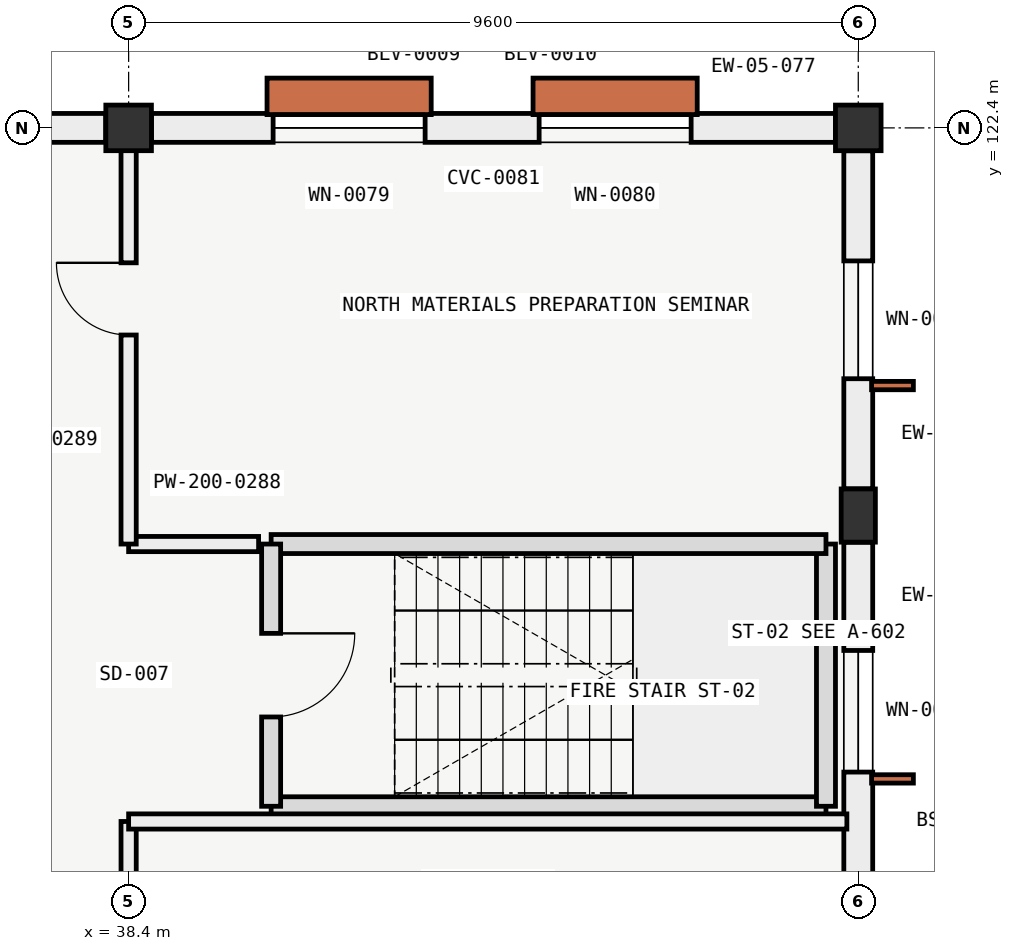
"""IFC4 building model, lengths in metres.
Left out: names, types, materials, properties, quantities, classifications, styles, units other than length and angle.
Written with IfcOpenShell. Run it as: python <this file> out.ifc"""

import sys

from ifc_helpers import new_model, si_unit, direction, frame, frame_2d, origin, origin_2d, place, context, subcontext, project, spatial, rectangle, extrude, element, fill, save


model = new_model("IFC4")
c1 = context("Model", 3, precision=1e-05, world=origin(), true_north=direction((0.0, 1.0)))
c2 = subcontext(c1, "Body", "Model", "MODEL_VIEW")
j1 = project(units=[si_unit("LENGTHUNIT", "METRE"), si_unit("PLANEANGLEUNIT", "RADIAN")], contexts=[c1])
p1 = place(None, origin())
s1 = spatial("IfcSite", under=j1, at=p1, CompositionType="ELEMENT")
p2 = place(p1, origin())
s2 = spatial("IfcBuilding", under=s1, at=p2, CompositionType="ELEMENT")
p3 = place(p2, frame((0.0, 0.0, 5.4)))
s3 = spatial("IfcBuildingStorey", under=s2, at=p3, CompositionType="ELEMENT", Elevation=5.4)
for number, where, z_axis, x_axis in (
    (1, (38.4, 122.4, 0.0), (0.0, 0.0, 1.0), (1.0, 0.0, 0.0)),
    (2, (48.0, 122.4, 0.0), (0.0, 0.0, 1.0), (1.0, 0.0, 0.0)),
):
    element("IfcColumn", number, at=place(p3, frame(where, z_axis=z_axis, x_axis=x_axis)), inside=s3, PredefinedType="COLUMN", context=c2, shape_type="SweptSolid", body=[
        extrude(rectangle(XDim=0.6, YDim=0.6, at=origin_2d()), origin(), (0.0, 0.0, 1.0), 4.2),
    ])
p4 = place(p3, frame((48.0, 117.3, 0.0), z_axis=(0.0, 0.0, 1.0), x_axis=(1.0, 0.0, 0.0)))
e3 = element("IfcColumn", 3, at=p4, inside=s3, PredefinedType="PILASTER", context=c2, shape_type="SweptSolid", body=[
    extrude(rectangle(XDim=0.45, YDim=0.7, at=origin_2d()), origin(), (0.0, 0.0, 1.0), 4.2),
])
p5 = place(p3, frame((48.0, 116.949, 0.0), z_axis=(0.0, 0.0, 1.0), x_axis=(0.0, -1.0, 0.0)))
e4 = element("IfcWall", 4, at=p5, inside=s3, PredefinedType="SOLIDWALL", context=c2, shape_type="SweptSolid", body=[
    extrude(rectangle(XDim=4.448, YDim=0.38, at=frame_2d((2.224, 0.0))), origin(), (0.0, 0.0, 1.0), 3.25),
])
p6 = place(p5, frame((1.424, 0.0, 0.95)))
e5 = element("IfcOpeningElement", 5, at=p6, cuts=e4, PredefinedType="OPENING", context=c2, shape_type="SweptSolid", body=[
    extrude(rectangle(XDim=1.6, YDim=1.9, at=frame_2d((0.8, 0.95))), frame((0.0, 0.2, 0.0), z_axis=(0.0, -1.0, 0.0), x_axis=(1.0, 0.0, 0.0)), (0.0, 0.0, 1.0), 0.4),
])
p7 = place(p3, frame((48.0, 122.099, 0.0), z_axis=(0.0, 0.0, 1.0), x_axis=(0.0, -1.0, 0.0)))
e6 = element("IfcWall", 6, at=p7, inside=s3, PredefinedType="SOLIDWALL", context=c2, shape_type="SweptSolid", body=[
    extrude(rectangle(XDim=4.448, YDim=0.38, at=frame_2d((2.224, 0.0))), origin(), (0.0, 0.0, 1.0), 3.25),
])
p8 = place(p7, frame((1.449, 0.0, 0.95)))
e7 = element("IfcOpeningElement", 7, at=p8, cuts=e6, PredefinedType="OPENING", context=c2, shape_type="SweptSolid", body=[
    extrude(rectangle(XDim=1.55, YDim=1.85, at=frame_2d((0.775, 0.925))), frame((0.0, 0.2, 0.0), z_axis=(0.0, -1.0, 0.0), x_axis=(1.0, 0.0, 0.0)), (0.0, 0.0, 1.0), 0.4),
])
p9 = place(p3, frame((35.4, 122.4, 0.0), z_axis=(0.0, 0.0, 1.0), x_axis=(1.0, 0.0, 0.0)))
e8 = element("IfcWall", 8, at=p9, inside=s3, PredefinedType="SOLIDWALL", context=c2, shape_type="SweptSolid", body=[
    extrude(rectangle(XDim=2.699, YDim=0.38, at=frame_2d((1.35, 0.0))), origin(), (0.0, 0.0, 1.0), 3.298),
])
p10 = place(p9, frame((0.899, 0.0, 0.85)))
e9 = element("IfcOpeningElement", 9, at=p10, cuts=e8, PredefinedType="OPENING", context=c2, shape_type="SweptSolid", body=[
    extrude(rectangle(XDim=0.9, YDim=2.2, at=frame_2d((0.45, 1.1))), frame((0.0, 0.2, 0.0), z_axis=(0.0, -1.0, 0.0), x_axis=(1.0, 0.0, 0.0)), (0.0, 0.0, 1.0), 0.4),
])
p11 = place(p3, frame((38.701, 122.4, 0.0), z_axis=(0.0, 0.0, 1.0), x_axis=(1.0, 0.0, 0.0)))
e10 = element("IfcWall", 10, at=p11, inside=s3, PredefinedType="SOLIDWALL", context=c2, shape_type="SweptSolid", body=[
    extrude(rectangle(XDim=8.998, YDim=0.38, at=frame_2d((4.499, 0.0))), origin(), (0.0, 0.0, 1.0), 3.32),
])
p12 = place(p11, frame((1.6, 0.0, 0.85)))
e11 = element("IfcOpeningElement", 11, at=p12, cuts=e10, PredefinedType="OPENING", context=c2, shape_type="SweptSolid", body=[
    extrude(rectangle(XDim=2.0, YDim=1.35, at=frame_2d((1.0, 0.675))), frame((0.0, 0.2, 0.0), z_axis=(0.0, -1.0, 0.0), x_axis=(1.0, 0.0, 0.0)), (0.0, 0.0, 1.0), 0.4),
])
p13 = place(p11, frame((5.1, 0.0, 0.85)))
e12 = element("IfcOpeningElement", 12, at=p13, cuts=e10, PredefinedType="OPENING", context=c2, shape_type="SweptSolid", body=[
    extrude(rectangle(XDim=2.0, YDim=1.35, at=frame_2d((1.0, 0.675))), frame((0.0, 0.2, 0.0), z_axis=(0.0, -1.0, 0.0), x_axis=(1.0, 0.0, 0.0)), (0.0, 0.0, 1.0), 0.4),
])
p14 = place(p3, frame((40.275, 113.475, 0.0), z_axis=(0.0, 0.0, 1.0), x_axis=(1.0, 0.0, 0.0)))
e13 = element("IfcWall", 13, at=p14, inside=s3, PredefinedType="SOLIDWALL", context=c2, shape_type="SweptSolid", body=[
    extrude(rectangle(XDim=7.3, YDim=0.25, at=frame_2d((3.65, 0.0))), origin(), (0.0, 0.0, 1.0), 3.92),
])
p15 = place(p3, frame((47.575, 113.475, 0.0), z_axis=(0.0, 0.0, 1.0), x_axis=(0.0, 1.0, 0.0)))
e14 = element("IfcWall", 14, at=p15, inside=s3, PredefinedType="SOLIDWALL", context=c2, shape_type="SweptSolid", body=[
    extrude(rectangle(XDim=3.45, YDim=0.25, at=frame_2d((1.725, 0.0))), origin(), (0.0, 0.0, 1.0), 3.92),
])
p16 = place(p3, frame((47.575, 116.925, 0.0), z_axis=(0.0, 0.0, 1.0), x_axis=(-1.0, 0.0, 0.0)))
e15 = element("IfcWall", 15, at=p16, inside=s3, PredefinedType="SOLIDWALL", context=c2, shape_type="SweptSolid", body=[
    extrude(rectangle(XDim=7.3, YDim=0.25, at=frame_2d((3.65, 0.0))), origin(), (0.0, 0.0, 1.0), 3.92),
])
p17 = place(p3, frame((40.275, 116.925, 0.0), z_axis=(0.0, 0.0, 1.0), x_axis=(0.0, -1.0, 0.0)))
e16 = element("IfcWall", 16, at=p17, inside=s3, PredefinedType="SOLIDWALL", context=c2, shape_type="SweptSolid", body=[
    extrude(rectangle(XDim=3.45, YDim=0.25, at=frame_2d((1.725, 0.0))), origin(), (0.0, 0.0, 1.0), 3.92),
])
p18 = place(p17, frame((1.175, 0.0, 0.0)))
e17 = element("IfcOpeningElement", 17, at=p18, cuts=e16, PredefinedType="OPENING", context=c2, shape_type="SweptSolid", body=[
    extrude(rectangle(XDim=1.1, YDim=2.2, at=frame_2d((0.55, 1.1))), frame((0.0, 0.135, 0.0), z_axis=(0.0, -1.0, 0.0), x_axis=(1.0, 0.0, 0.0)), (0.0, 0.0, 1.0), 0.27),
])
p19 = place(p3, frame((38.4, 88.375, 0.0), z_axis=(0.0, 0.0, 1.0), x_axis=(0.0, 1.0, 0.0)))
e18 = element("IfcWall", 18, at=p19, inside=s3, PredefinedType="PARTITIONING", context=c2, shape_type="SweptSolid", body=[
    extrude(rectangle(XDim=24.9, YDim=0.2, at=frame_2d((12.45, 0.0))), origin(), (0.0, 0.0, 1.0), 3.298),
])
p20 = place(p19, frame((5.8, 0.0, 0.0)))
e19 = element("IfcOpeningElement", 19, at=p20, cuts=e18, PredefinedType="OPENING", context=c2, shape_type="SweptSolid", body=[
    extrude(rectangle(XDim=0.95, YDim=2.1, at=frame_2d((0.475, 1.05))), frame((0.0, 0.11, 0.0), z_axis=(0.0, -1.0, 0.0), x_axis=(1.0, 0.0, 0.0)), (0.0, 0.0, 1.0), 0.22),
])
p21 = place(p19, frame((11.2, 0.0, 0.0)))
e20 = element("IfcOpeningElement", 20, at=p21, cuts=e18, PredefinedType="OPENING", context=c2, shape_type="SweptSolid", body=[
    extrude(rectangle(XDim=0.95, YDim=2.1, at=frame_2d((0.475, 1.05))), frame((0.0, 0.11, 0.0), z_axis=(0.0, -1.0, 0.0), x_axis=(1.0, 0.0, 0.0)), (0.0, 0.0, 1.0), 0.22),
])
p22 = place(p19, frame((20.6, 0.0, 0.0)))
e21 = element("IfcOpeningElement", 21, at=p22, cuts=e18, PredefinedType="OPENING", context=c2, shape_type="SweptSolid", body=[
    extrude(rectangle(XDim=0.95, YDim=2.1, at=frame_2d((0.475, 1.05))), frame((0.0, 0.11, 0.0), z_axis=(0.0, -1.0, 0.0), x_axis=(1.0, 0.0, 0.0)), (0.0, 0.0, 1.0), 0.22),
])
p23 = place(p3, frame((38.4, 113.275, 0.0), z_axis=(0.0, 0.0, 1.0), x_axis=(1.0, 0.0, 0.0)))
e22 = element("IfcWall", 22, at=p23, inside=s3, PredefinedType="PARTITIONING", context=c2, shape_type="SweptSolid", body=[
    extrude(rectangle(XDim=9.45, YDim=0.2, at=frame_2d((4.725, 0.0))), origin(), (0.0, 0.0, 1.0), 3.443),
])
p24 = place(p3, frame((38.4, 116.925, 0.0), z_axis=(0.0, 0.0, 1.0), x_axis=(1.0, 0.0, 0.0)))
e23 = element("IfcWall", 23, at=p24, inside=s3, PredefinedType="PARTITIONING", context=c2, shape_type="SweptSolid", body=[
    extrude(rectangle(XDim=1.71, YDim=0.2, at=frame_2d((0.855, 0.0))), origin(), (0.0, 0.0, 1.0), 3.443),
])
p25 = place(p3, frame((38.4, 116.925, 0.0), z_axis=(0.0, 0.0, 1.0), x_axis=(0.0, 1.0, 0.0)))
e24 = element("IfcWall", 24, at=p25, inside=s3, PredefinedType="PARTITIONING", context=c2, shape_type="SweptSolid", body=[
    extrude(rectangle(XDim=5.325, YDim=0.2, at=frame_2d((2.663, 0.0))), origin(), (0.0, 0.0, 1.0), 3.443),
])
p26 = place(p25, frame((2.75, 0.0, 0.0)))
e25 = element("IfcOpeningElement", 25, at=p26, cuts=e24, PredefinedType="OPENING", context=c2, shape_type="SweptSolid", body=[
    extrude(rectangle(XDim=0.95, YDim=2.1, at=frame_2d((0.475, 1.05))), frame((0.0, 0.11, 0.0), z_axis=(0.0, -1.0, 0.0), x_axis=(1.0, 0.0, 0.0)), (0.0, 0.0, 1.0), 0.22),
])
p27 = place(p6, origin())
e26 = element("IfcWindow", 26, at=p27, inside=s3, PartitioningType="SINGLE_PANEL", PredefinedType="WINDOW", context=c2, shape_type="SweptSolid", body=[
    extrude(rectangle(XDim=1.6, YDim=1.9, at=frame_2d((0.8, 0.95))), frame((0.0, 0.03, 0.0), z_axis=(0.0, -1.0, 0.0), x_axis=(1.0, 0.0, 0.0)), (0.0, 0.0, 1.0), 0.06),
])
fill(e5, e26)
p28 = place(p8, origin())
e27 = element("IfcWindow", 27, at=p28, inside=s3, PartitioningType="SINGLE_PANEL", PredefinedType="WINDOW", context=c2, shape_type="SweptSolid", body=[
    extrude(rectangle(XDim=1.55, YDim=1.85, at=frame_2d((0.775, 0.925))), frame((0.0, 0.03, 0.0), z_axis=(0.0, -1.0, 0.0), x_axis=(1.0, 0.0, 0.0)), (0.0, 0.0, 1.0), 0.06),
])
fill(e7, e27)
p29 = place(p12, origin())
e28 = element("IfcWindow", 28, at=p29, inside=s3, PartitioningType="SINGLE_PANEL", PredefinedType="WINDOW", context=c2, shape_type="SweptSolid", body=[
    extrude(rectangle(XDim=2.0, YDim=1.35, at=frame_2d((1.0, 0.675))), frame((0.0, 0.03, 0.0), z_axis=(0.0, -1.0, 0.0), x_axis=(1.0, 0.0, 0.0)), (0.0, 0.0, 1.0), 0.06),
])
fill(e11, e28)
p30 = place(p13, origin())
e29 = element("IfcWindow", 29, at=p30, inside=s3, PartitioningType="SINGLE_PANEL", PredefinedType="WINDOW", context=c2, shape_type="SweptSolid", body=[
    extrude(rectangle(XDim=2.0, YDim=1.35, at=frame_2d((1.0, 0.675))), frame((0.0, 0.03, 0.0), z_axis=(0.0, -1.0, 0.0), x_axis=(1.0, 0.0, 0.0)), (0.0, 0.0, 1.0), 0.06),
])
fill(e12, e29)
p31 = place(p18, origin())
e30 = element("IfcDoor", 30, at=p31, inside=s3, OperationType="SINGLE_SWING_LEFT", PredefinedType="DOOR", context=c2, shape_type="SweptSolid", body=[
    extrude(rectangle(XDim=1.1, YDim=2.2, at=frame_2d((0.55, 1.1))), frame((0.0, 0.025, 0.0), z_axis=(0.0, -1.0, 0.0), x_axis=(1.0, 0.0, 0.0)), (0.0, 0.0, 1.0), 0.05),
])
fill(e17, e30)
p32 = place(p26, origin())
e31 = element("IfcDoor", 31, at=p32, inside=s3, OperationType="SINGLE_SWING_RIGHT", PredefinedType="DOOR", context=c2, shape_type="SweptSolid", body=[
    extrude(rectangle(XDim=0.95, YDim=2.1, at=frame_2d((0.475, 1.05))), frame((0.0, 0.025, 0.0), z_axis=(0.0, -1.0, 0.0), x_axis=(1.0, 0.0, 0.0)), (0.0, 0.0, 1.0), 0.05),
])
fill(e25, e31)
save(model, sys.argv[1])
